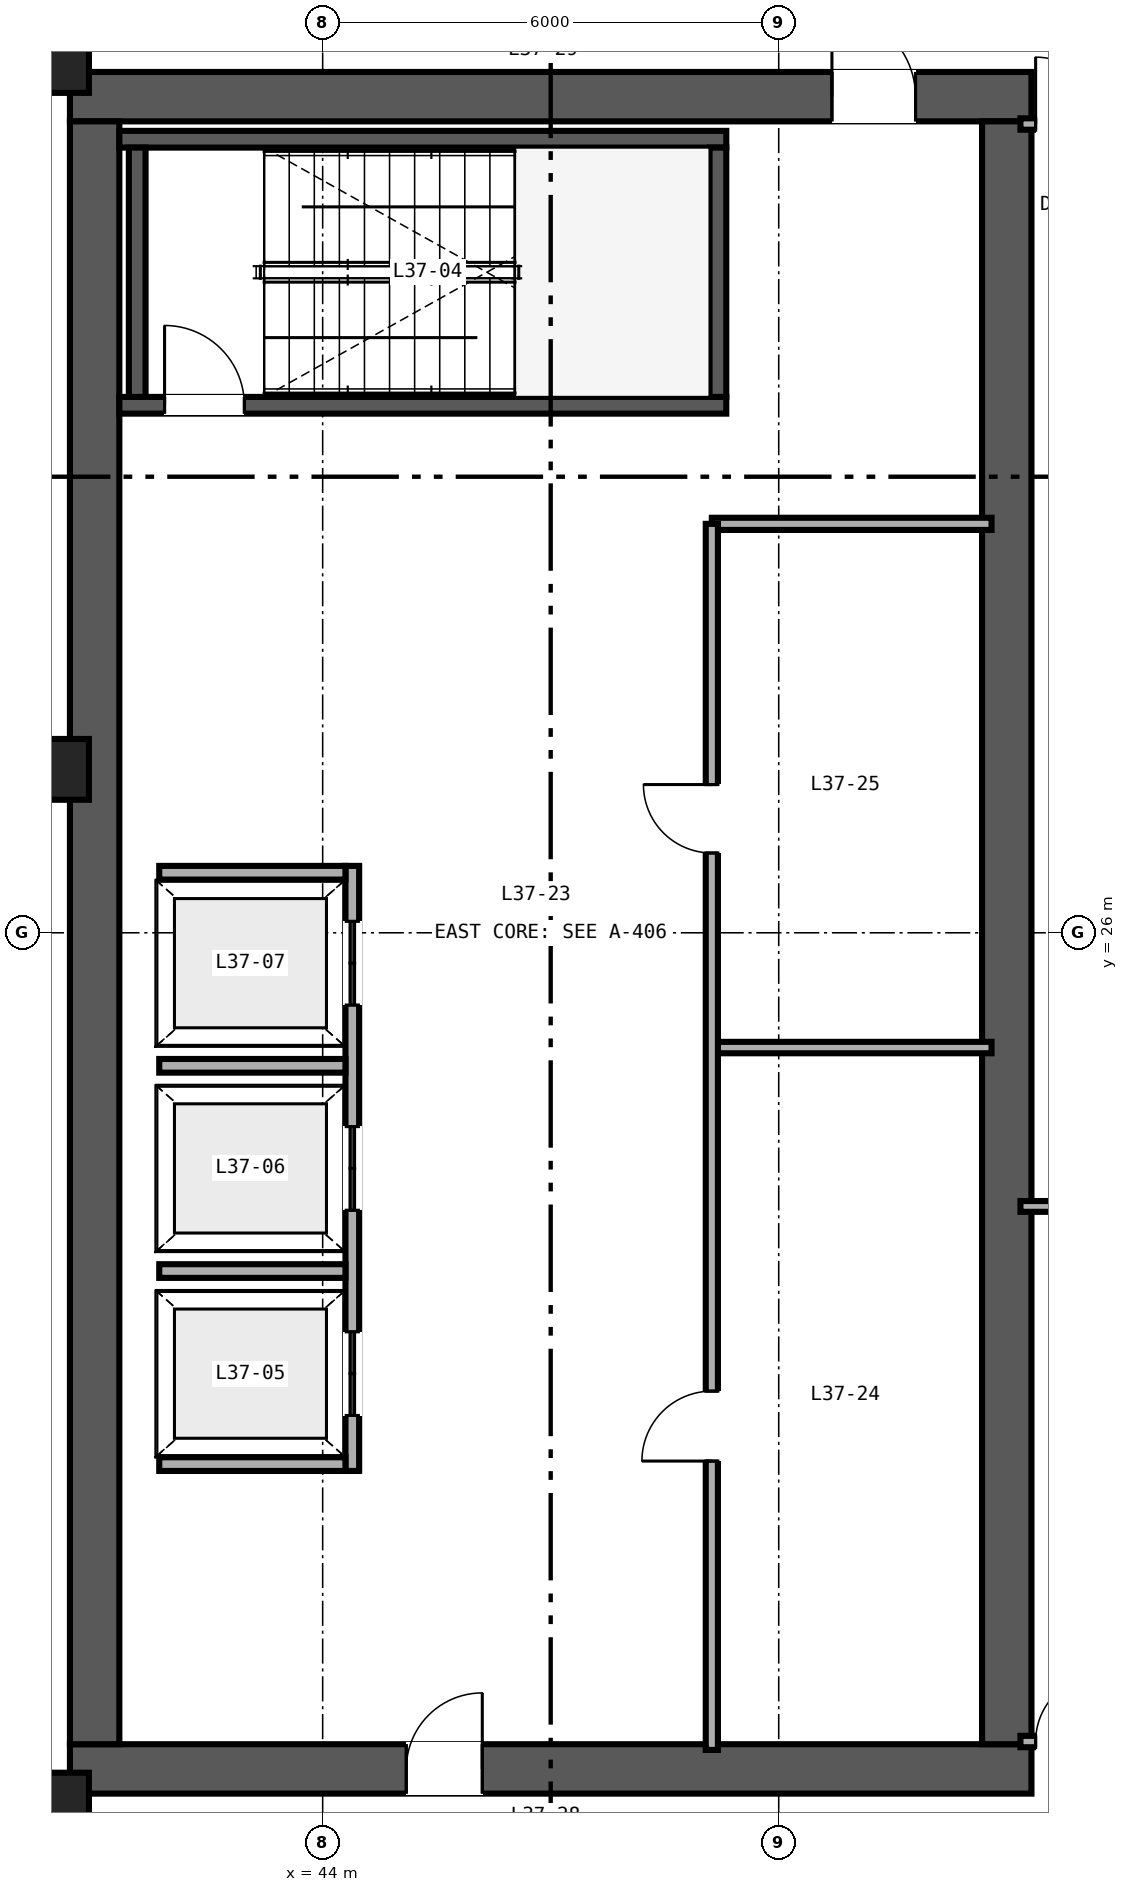
"""IFC4 building model, lengths in metres.
Left out: names, types, materials, properties, quantities, classifications, styles, units other than length and angle.
Written with IfcOpenShell. Run it as: python <this file> out.ifc"""

import sys

from ifc_helpers import new_model, si_unit, direction, frame, frame_2d, origin, origin_2d, place, context, subcontext, project, spatial, rectangle, hollow_rectangle, extrude, source, transform, mapped, element, fill, save


model = new_model("IFC4")
c1 = context("Model", 3, precision=1e-05, world=origin(), true_north=direction((0.0, 1.0)))
c2 = subcontext(c1, "Body", "Model", "MODEL_VIEW")
j1 = project(units=[si_unit("LENGTHUNIT", "METRE"), si_unit("PLANEANGLEUNIT", "RADIAN")], contexts=[c1])
p1 = place(None, origin())
s1 = spatial("IfcSite", under=j1, at=p1, CompositionType="ELEMENT")
p2 = place(p1, origin())
s2 = spatial("IfcBuilding", under=s1, at=p2, CompositionType="ELEMENT")
p3 = place(p2, frame((0.0, 0.0, 147.6)))
s3 = spatial("IfcBuildingStorey", under=s2, at=p3, CompositionType="ELEMENT", Elevation=147.6)
p4 = place(p3, frame((40.675, 15.0, 0.0), z_axis=(0.0, 0.0, 1.0), x_axis=(1.0, 0.0, 0.0)))
e1 = element("IfcWall", 1, at=p4, inside=s3, PredefinedType="SHEAR", context=c2, shape_type="SweptSolid", body=[
    extrude(rectangle(XDim=12.65, YDim=0.65, at=frame_2d((6.325, 0.0))), origin(), (0.0, 0.0, 1.0), 3.28),
])
p5 = place(p4, frame((4.425, 0.0, 0.0)))
e2 = element("IfcOpeningElement", 2, at=p5, cuts=e1, PredefinedType="OPENING", context=c2, shape_type="SweptSolid", body=[
    extrude(rectangle(XDim=1.0, YDim=2.15, at=frame_2d((0.5, 1.075))), frame((0.0, 0.335, 0.0), z_axis=(0.0, -1.0, 0.0), x_axis=(1.0, 0.0, 0.0)), (0.0, 0.0, 1.0), 0.67),
])
p6 = place(p3, frame((40.675, 37.0, 0.0), z_axis=(0.0, 0.0, 1.0), x_axis=(1.0, 0.0, 0.0)))
e3 = element("IfcWall", 3, at=p6, inside=s3, PredefinedType="SHEAR", context=c2, shape_type="SweptSolid", body=[
    extrude(rectangle(XDim=12.65, YDim=0.65, at=frame_2d((6.325, 0.0))), origin(), (0.0, 0.0, 1.0), 3.28),
])
p7 = place(p6, frame((10.025, 0.0, 0.0)))
e4 = element("IfcOpeningElement", 4, at=p7, cuts=e3, PredefinedType="OPENING", context=c2, shape_type="SweptSolid", body=[
    extrude(rectangle(XDim=1.1, YDim=2.15, at=frame_2d((0.55, 1.075))), frame((0.0, 0.335, 0.0), z_axis=(0.0, -1.0, 0.0), x_axis=(1.0, 0.0, 0.0)), (0.0, 0.0, 1.0), 0.67),
])
for number, where, z_axis, x_axis in (
    (5, (41.0, 15.325, 0.0), (0.0, 0.0, 1.0), (0.0, 1.0, 0.0)),
    (6, (53.0, 15.325, 0.0), (0.0, 0.0, 1.0), (0.0, 1.0, 0.0)),
):
    element("IfcWall", number, at=place(p3, frame(where, z_axis=z_axis, x_axis=x_axis)), inside=s3, PredefinedType="SHEAR", context=c2, shape_type="SweptSolid", body=[
        extrude(rectangle(XDim=21.35, YDim=0.65, at=frame_2d((10.675, 0.0))), origin(), (0.0, 0.0, 1.0), 3.28),
    ])
p8 = place(p3, frame((41.325, 32.94, 0.0), z_axis=(0.0, 0.0, 1.0), x_axis=(1.0, 0.0, 0.0)))
e7 = element("IfcWall", 7, at=p8, inside=s3, PredefinedType="SHEAR", context=c2, shape_type="SweptSolid", body=[
    extrude(rectangle(XDim=7.985, YDim=0.22, at=frame_2d((3.993, 0.0))), origin(), (0.0, 0.0, 1.0), 3.4),
])
p9 = place(p8, frame((0.595, 0.0, 0.0)))
e8 = element("IfcOpeningElement", 8, at=p9, cuts=e7, PredefinedType="OPENING", context=c2, shape_type="SweptSolid", body=[
    extrude(rectangle(XDim=1.05, YDim=2.15, at=frame_2d((0.525, 1.075))), frame((0.0, 0.12, 0.0), z_axis=(0.0, -1.0, 0.0), x_axis=(1.0, 0.0, 0.0)), (0.0, 0.0, 1.0), 0.24),
])
p10 = place(p3, frame((41.325, 36.44, 0.0), z_axis=(0.0, 0.0, 1.0), x_axis=(1.0, 0.0, 0.0)))
e9 = element("IfcWall", 9, at=p10, inside=s3, PredefinedType="SHEAR", context=c2, shape_type="SweptSolid", body=[
    extrude(rectangle(XDim=7.985, YDim=0.22, at=frame_2d((3.993, 0.0))), origin(), (0.0, 0.0, 1.0), 3.4),
])
for number, where, z_axis, x_axis in (
    (10, (41.56, 33.05, 0.0), (0.0, 0.0, 1.0), (0.0, 1.0, 0.0)),
    (11, (49.2, 33.05, 0.0), (0.0, 0.0, 1.0), (0.0, 1.0, 0.0)),
):
    element("IfcWall", number, at=place(p3, frame(where, z_axis=z_axis, x_axis=x_axis)), inside=s3, PredefinedType="SHEAR", context=c2, shape_type="SweptSolid", body=[
        extrude(rectangle(XDim=3.28, YDim=0.22, at=frame_2d((1.64, 0.0))), origin(), (0.0, 0.0, 1.0), 3.4),
    ])
m1 = source(origin(), c2, "Body", "SweptSolid", [
    extrude(hollow_rectangle(XDim=0.85, YDim=0.8, WallThickness=0.032, at=origin_2d()), origin(), (0.0, 0.0, 1.0), 3.28),
])
for number, where, z_axis, x_axis in (
    (12, (40.5, 14.55, 0.0), (0.0, 0.0, 1.0), (1.0, 0.0, 0.0)),
    (13, (40.5, 28.15, 0.0), (0.0, 0.0, 1.0), (1.0, 0.0, 0.0)),
    (14, (40.5, 37.45, 0.0), (0.0, 0.0, 1.0), (1.0, 0.0, 0.0)),
):
    element("IfcColumn", number, at=place(p3, frame(where, z_axis=z_axis, x_axis=x_axis)), inside=s3, PredefinedType="COLUMN", context=c2, shape_type="MappedRepresentation", body=[
        mapped(m1, transform((0.0, 0.0, 0.0), scale=1.0)),
    ])
p11 = place(p3, frame((44.39, 18.92, 0.0), z_axis=(0.0, 0.0, 1.0), x_axis=(0.0, 1.0, 0.0)))
e15 = element("IfcWall", 15, at=p11, inside=s3, PredefinedType="SOLIDWALL", context=c2, shape_type="SweptSolid", body=[
    extrude(rectangle(XDim=7.96, YDim=0.18, at=frame_2d((3.98, 0.0))), origin(), (0.0, 0.0, 1.0), 3.28),
])
p12 = place(p11, frame((0.73, 0.0, 0.0)))
e16 = element("IfcOpeningElement", 16, at=p12, cuts=e15, PredefinedType="OPENING", context=c2, shape_type="SweptSolid", body=[
    extrude(rectangle(XDim=1.1, YDim=2.2, at=frame_2d((0.55, 1.1))), frame((0.0, 0.1, 0.0), z_axis=(0.0, -1.0, 0.0), x_axis=(1.0, 0.0, 0.0)), (0.0, 0.0, 1.0), 0.2),
])
p13 = place(p11, frame((3.43, 0.0, 0.0)))
e17 = element("IfcOpeningElement", 17, at=p13, cuts=e15, PredefinedType="OPENING", context=c2, shape_type="SweptSolid", body=[
    extrude(rectangle(XDim=1.1, YDim=2.2, at=frame_2d((0.55, 1.1))), frame((0.0, 0.1, 0.0), z_axis=(0.0, -1.0, 0.0), x_axis=(1.0, 0.0, 0.0)), (0.0, 0.0, 1.0), 0.2),
])
p14 = place(p11, frame((6.13, 0.0, 0.0)))
e18 = element("IfcOpeningElement", 18, at=p14, cuts=e15, PredefinedType="OPENING", context=c2, shape_type="SweptSolid", body=[
    extrude(rectangle(XDim=1.1, YDim=2.2, at=frame_2d((0.55, 1.1))), frame((0.0, 0.1, 0.0), z_axis=(0.0, -1.0, 0.0), x_axis=(1.0, 0.0, 0.0)), (0.0, 0.0, 1.0), 0.2),
])
for number, where, z_axis, x_axis in (
    (19, (41.85, 19.01, 0.0), (0.0, 0.0, 1.0), (1.0, 0.0, 0.0)),
    (20, (41.85, 26.79, 0.0), (0.0, 0.0, 1.0), (1.0, 0.0, 0.0)),
    (21, (41.85, 21.55, 0.0), (0.0, 0.0, 1.0), (1.0, 0.0, 0.0)),
    (22, (41.85, 24.25, 0.0), (0.0, 0.0, 1.0), (1.0, 0.0, 0.0)),
):
    element("IfcWall", number, at=place(p3, frame(where, z_axis=z_axis, x_axis=x_axis)), inside=s3, PredefinedType="SOLIDWALL", context=c2, shape_type="SweptSolid", body=[
        extrude(rectangle(XDim=2.45, YDim=0.18, at=frame_2d((1.225, 0.0))), origin(), (0.0, 0.0, 1.0), 3.28),
    ])
p15 = place(p3, frame((49.12, 31.38, 0.0), z_axis=(0.0, 0.0, 1.0), x_axis=(1.0, 0.0, 0.0)))
e23 = element("IfcWall", 23, at=p15, inside=s3, PredefinedType="PARTITIONING", context=c2, shape_type="SweptSolid", body=[
    extrude(rectangle(XDim=3.68, YDim=0.16, at=frame_2d((1.84, 0.0))), origin(), (0.0, 0.0, 1.0), 2.36),
])
p16 = place(p3, frame((49.12, 24.49, 0.0), z_axis=(0.0, 0.0, 1.0), x_axis=(1.0, 0.0, 0.0)))
e24 = element("IfcWall", 24, at=p16, inside=s3, PredefinedType="PARTITIONING", context=c2, shape_type="SweptSolid", body=[
    extrude(rectangle(XDim=3.68, YDim=0.15, at=frame_2d((1.84, 0.0))), origin(), (0.0, 0.0, 1.0), 3.28),
])
p17 = place(p3, frame((49.12, 15.25, 0.0), z_axis=(0.0, 0.0, 1.0), x_axis=(0.0, 1.0, 0.0)))
e25 = element("IfcWall", 25, at=p17, inside=s3, PredefinedType="PARTITIONING", context=c2, shape_type="SweptSolid", body=[
    extrude(rectangle(XDim=16.13, YDim=0.16, at=frame_2d((8.065, 0.0))), origin(), (0.0, 0.0, 1.0), 2.36),
])
p18 = place(p17, frame((3.8, 0.0, 0.0)))
e26 = element("IfcOpeningElement", 26, at=p18, cuts=e25, PredefinedType="OPENING", context=c2, shape_type="SweptSolid", body=[
    extrude(rectangle(XDim=0.92, YDim=2.15, at=frame_2d((0.46, 1.075))), frame((0.0, 0.09, 0.0), z_axis=(0.0, -1.0, 0.0), x_axis=(1.0, 0.0, 0.0)), (0.0, 0.0, 1.0), 0.18),
])
p19 = place(p17, frame((11.8, 0.0, 0.0)))
e27 = element("IfcOpeningElement", 27, at=p19, cuts=e25, PredefinedType="OPENING", context=c2, shape_type="SweptSolid", body=[
    extrude(rectangle(XDim=0.9, YDim=2.15, at=frame_2d((0.45, 1.075))), frame((0.0, 0.09, 0.0), z_axis=(0.0, -1.0, 0.0), x_axis=(1.0, 0.0, 0.0)), (0.0, 0.0, 1.0), 0.18),
])
p20 = place(p3, frame((53.18, 15.36, 0.0), z_axis=(0.0, 0.0, 1.0), x_axis=(1.0, 0.0, 0.0)))
e28 = element("IfcWall", 28, at=p20, inside=s3, PredefinedType="PARTITIONING", context=c2, shape_type="SweptSolid", body=[
    extrude(rectangle(XDim=2.66, YDim=0.15, at=frame_2d((1.33, 0.0))), origin(), (0.0, 0.0, 1.0), 2.501),
])
p21 = place(p20, frame((0.2, 0.0, 0.0)))
e29 = element("IfcOpeningElement", 29, at=p21, cuts=e28, PredefinedType="OPENING", context=c2, shape_type="SweptSolid", body=[
    extrude(rectangle(XDim=0.88, YDim=2.15, at=frame_2d((0.44, 1.075))), frame((0.0, 0.085, 0.0), z_axis=(0.0, -1.0, 0.0), x_axis=(1.0, 0.0, 0.0)), (0.0, 0.0, 1.0), 0.17),
])
p22 = place(p3, frame((53.18, 36.64, 0.0), z_axis=(0.0, 0.0, 1.0), x_axis=(1.0, 0.0, 0.0)))
e30 = element("IfcWall", 30, at=p22, inside=s3, PredefinedType="PARTITIONING", context=c2, shape_type="SweptSolid", body=[
    extrude(rectangle(XDim=2.66, YDim=0.15, at=frame_2d((1.33, 0.0))), origin(), (0.0, 0.0, 1.0), 2.663),
])
p23 = place(p22, frame((0.2, 0.0, 0.0)))
e31 = element("IfcOpeningElement", 31, at=p23, cuts=e30, PredefinedType="OPENING", context=c2, shape_type="SweptSolid", body=[
    extrude(rectangle(XDim=0.88, YDim=2.15, at=frame_2d((0.44, 1.075))), frame((0.0, 0.085, 0.0), z_axis=(0.0, -1.0, 0.0), x_axis=(1.0, 0.0, 0.0)), (0.0, 0.0, 1.0), 0.17),
])
p24 = place(p3, frame((53.18, 22.4, 0.0), z_axis=(0.0, 0.0, 1.0), x_axis=(1.0, 0.0, 0.0)))
e32 = element("IfcWall", 32, at=p24, inside=s3, PredefinedType="PARTITIONING", context=c2, shape_type="SweptSolid", body=[
    extrude(rectangle(XDim=2.66, YDim=0.142, at=frame_2d((1.33, 0.0))), origin(), (0.0, 0.0, 1.0), 2.501),
])
m2 = source(origin(), c2, "Body", "SweptSolid", [
    extrude(rectangle(XDim=1.05, YDim=2.15, at=frame_2d((0.525, 1.075))), frame((0.0, 0.025, 0.0), z_axis=(0.0, -1.0, 0.0), x_axis=(1.0, 0.0, 0.0)), (0.0, 0.0, 1.0), 0.05),
])
p25 = place(p9, origin())
e33 = element("IfcDoor", 33, at=p25, inside=s3, OperationType="SINGLE_SWING_LEFT", PredefinedType="DOOR", context=c2, shape_type="MappedRepresentation", body=[
    mapped(m2, transform((0.0, 0.0, 0.0), scale=1.0)),
])
fill(e8, e33)
m3 = source(origin(), c2, "Body", "SweptSolid", [
    extrude(rectangle(XDim=1.1, YDim=2.2, at=frame_2d((0.55, 1.1))), frame((0.0, 0.025, 0.0), z_axis=(0.0, -1.0, 0.0), x_axis=(1.0, 0.0, 0.0)), (0.0, 0.0, 1.0), 0.05),
])
p26 = place(p12, origin())
e34 = element("IfcDoor", 34, at=p26, inside=s3, OperationType="DOUBLE_DOOR_SLIDING", PredefinedType="DOOR", context=c2, shape_type="MappedRepresentation", body=[
    mapped(m3, transform((0.0, 0.0, 0.0), scale=1.0)),
])
fill(e16, e34)
p27 = place(p13, origin())
e35 = element("IfcDoor", 35, at=p27, inside=s3, OperationType="DOUBLE_DOOR_SLIDING", PredefinedType="DOOR", context=c2, shape_type="MappedRepresentation", body=[
    mapped(m3, transform((0.0, 0.0, 0.0), scale=1.0)),
])
fill(e17, e35)
p28 = place(p14, origin())
e36 = element("IfcDoor", 36, at=p28, inside=s3, OperationType="DOUBLE_DOOR_SLIDING", PredefinedType="DOOR", context=c2, shape_type="MappedRepresentation", body=[
    mapped(m3, transform((0.0, 0.0, 0.0), scale=1.0)),
])
fill(e18, e36)
m4 = source(origin(), c2, "Body", "SweptSolid", [
    extrude(rectangle(XDim=1.0, YDim=2.15, at=frame_2d((0.5, 1.075))), frame((0.0, 0.025, 0.0), z_axis=(0.0, -1.0, 0.0), x_axis=(1.0, 0.0, 0.0)), (0.0, 0.0, 1.0), 0.05),
])
p29 = place(p5, origin())
e37 = element("IfcDoor", 37, at=p29, inside=s3, OperationType="SINGLE_SWING_RIGHT", PredefinedType="DOOR", context=c2, shape_type="MappedRepresentation", body=[
    mapped(m4, transform((0.0, 0.0, 0.0), scale=1.0)),
])
fill(e2, e37)
m5 = source(origin(), c2, "Body", "SweptSolid", [
    extrude(rectangle(XDim=1.1, YDim=2.15, at=frame_2d((0.55, 1.075))), frame((0.0, 0.025, 0.0), z_axis=(0.0, -1.0, 0.0), x_axis=(1.0, 0.0, 0.0)), (0.0, 0.0, 1.0), 0.05),
])
p30 = place(p7, origin())
e38 = element("IfcDoor", 38, at=p30, inside=s3, OperationType="SINGLE_SWING_LEFT", PredefinedType="DOOR", context=c2, shape_type="MappedRepresentation", body=[
    mapped(m5, transform((0.0, 0.0, 0.0), scale=1.0)),
])
fill(e4, e38)
m6 = source(origin(), c2, "Body", "SweptSolid", [
    extrude(rectangle(XDim=0.92, YDim=2.15, at=frame_2d((0.46, 1.075))), frame((0.0, 0.025, 0.0), z_axis=(0.0, -1.0, 0.0), x_axis=(1.0, 0.0, 0.0)), (0.0, 0.0, 1.0), 0.05),
])
p31 = place(p18, origin())
e39 = element("IfcDoor", 39, at=p31, inside=s3, OperationType="SINGLE_SWING_LEFT", PredefinedType="DOOR", context=c2, shape_type="MappedRepresentation", body=[
    mapped(m6, transform((0.0, 0.0, 0.0), scale=1.0)),
])
fill(e26, e39)
m7 = source(origin(), c2, "Body", "SweptSolid", [
    extrude(rectangle(XDim=0.9, YDim=2.15, at=frame_2d((0.45, 1.075))), frame((0.0, 0.025, 0.0), z_axis=(0.0, -1.0, 0.0), x_axis=(1.0, 0.0, 0.0)), (0.0, 0.0, 1.0), 0.05),
])
p32 = place(p19, origin())
e40 = element("IfcDoor", 40, at=p32, inside=s3, OperationType="SINGLE_SWING_RIGHT", PredefinedType="DOOR", context=c2, shape_type="MappedRepresentation", body=[
    mapped(m7, transform((0.0, 0.0, 0.0), scale=1.0)),
])
fill(e27, e40)
m8 = source(origin(), c2, "Body", "SweptSolid", [
    extrude(rectangle(XDim=0.88, YDim=2.15, at=frame_2d((0.44, 1.075))), frame((0.0, 0.025, 0.0), z_axis=(0.0, -1.0, 0.0), x_axis=(1.0, 0.0, 0.0)), (0.0, 0.0, 1.0), 0.05),
])
p33 = place(p21, origin())
e41 = element("IfcDoor", 41, at=p33, inside=s3, OperationType="SINGLE_SWING_RIGHT", PredefinedType="DOOR", context=c2, shape_type="MappedRepresentation", body=[
    mapped(m8, transform((0.0, 0.0, 0.0), scale=1.0)),
])
fill(e29, e41)
p34 = place(p23, origin())
e42 = element("IfcDoor", 42, at=p34, inside=s3, OperationType="SINGLE_SWING_LEFT", PredefinedType="DOOR", context=c2, shape_type="MappedRepresentation", body=[
    mapped(m8, transform((0.0, 0.0, 0.0), scale=1.0)),
])
fill(e31, e42)
save(model, sys.argv[1])
